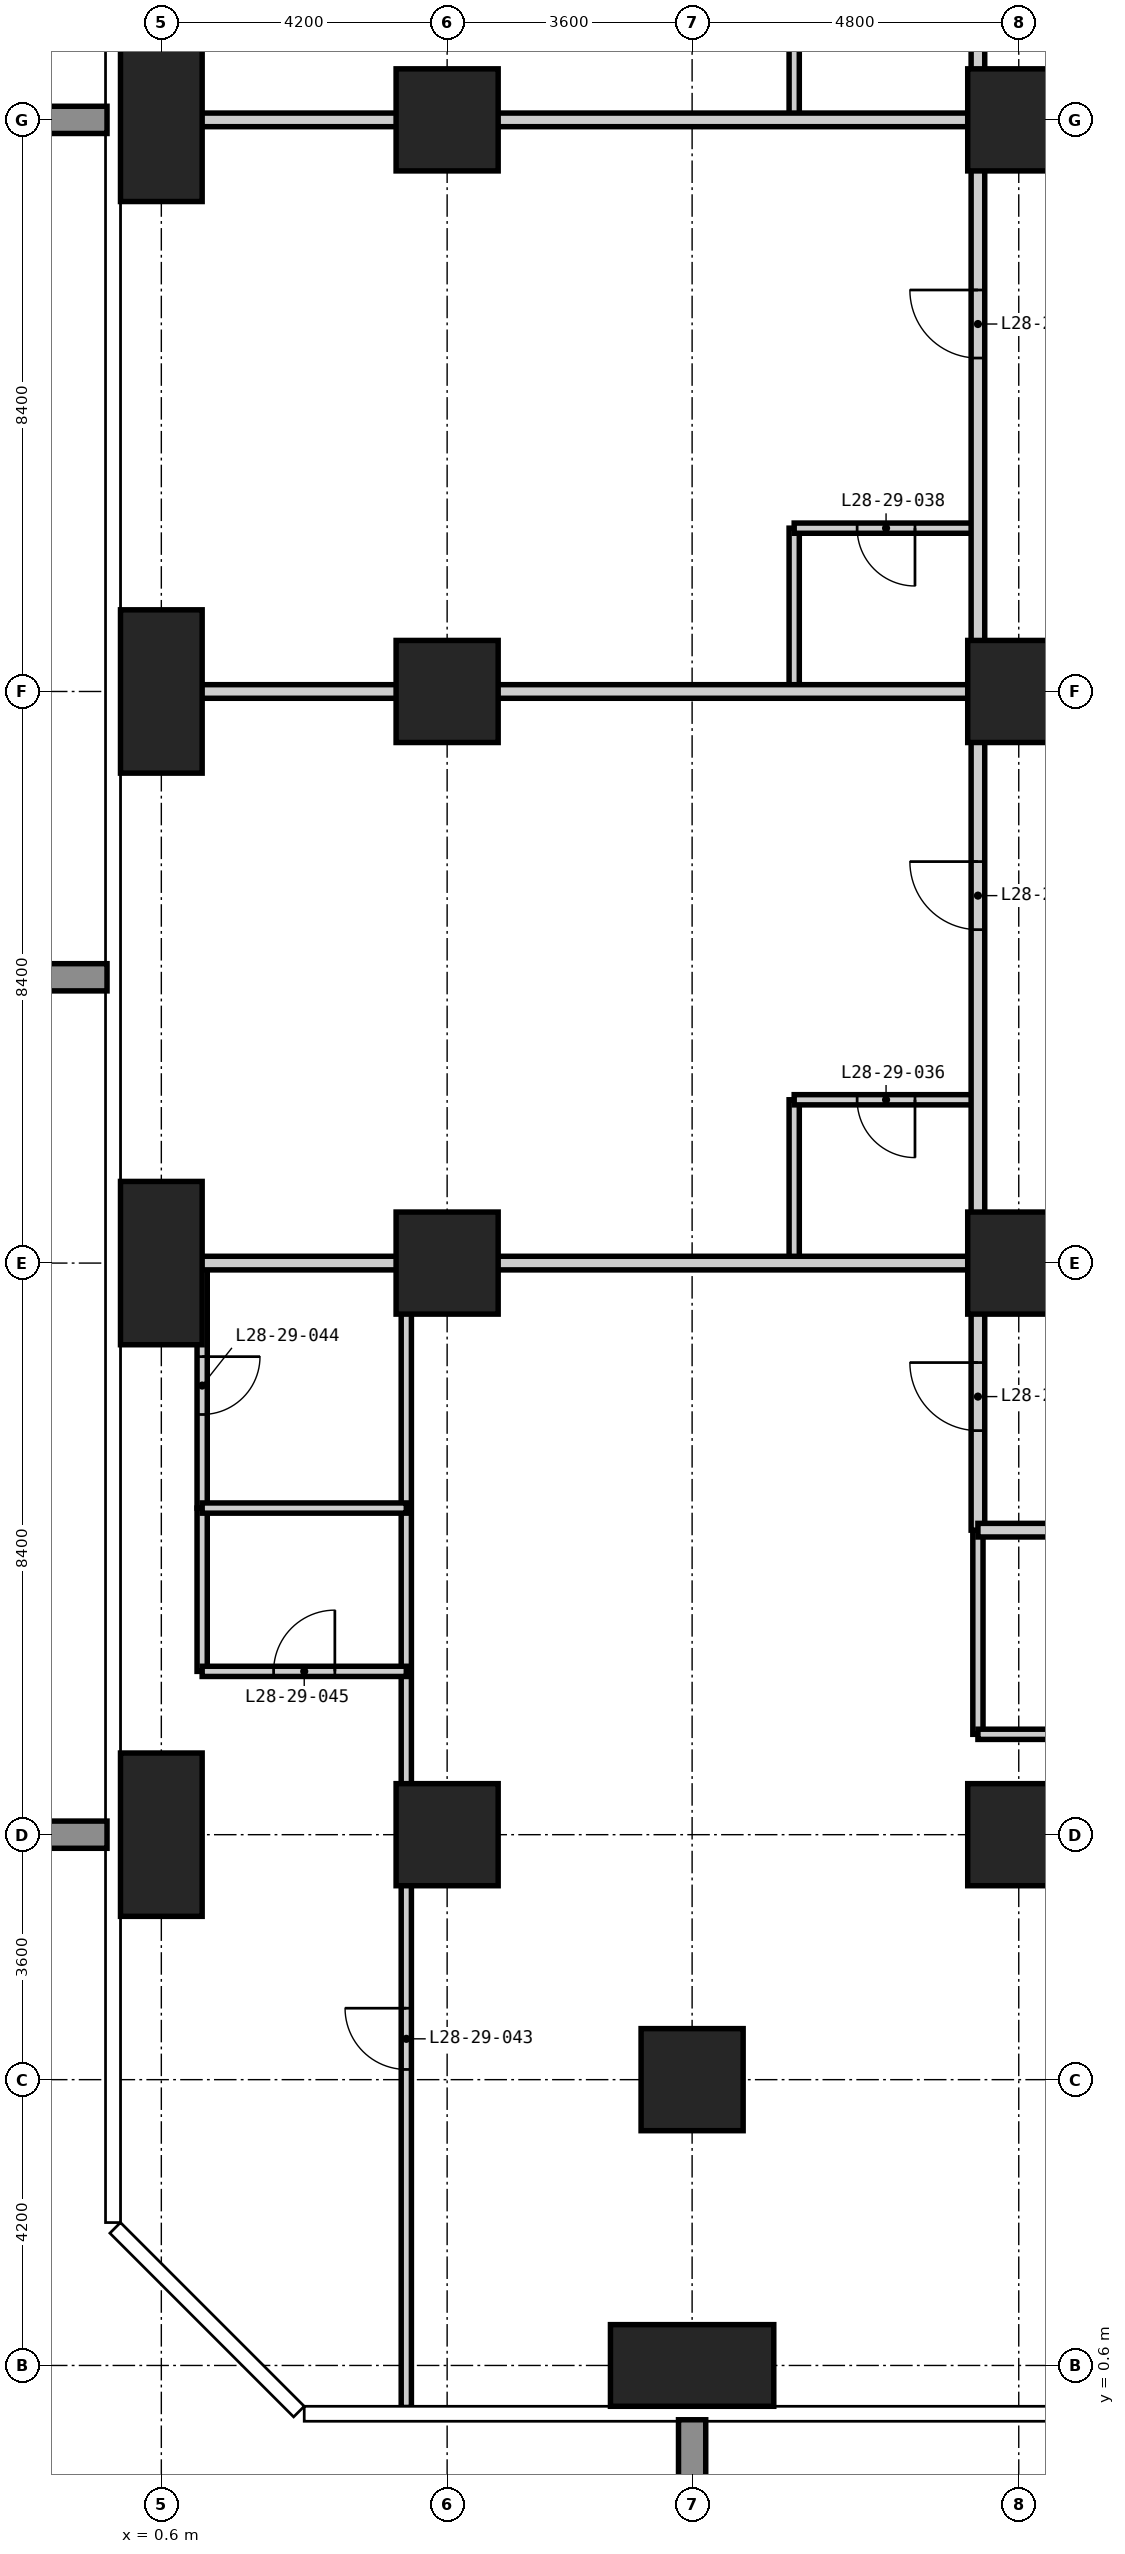
"""IFC4 building model, lengths in metres.
Left out: names, types, materials, properties, quantities, classifications, styles, units other than length and angle.
Written with IfcOpenShell. Run it as: python <this file> out.ifc"""

import sys

from ifc_helpers import new_model, si_unit, direction, frame, frame_2d, origin, origin_2d, place, context, subcontext, project, spatial, rectangle, extrude, element, fill, save


model = new_model("IFC4")
c1 = context("Model", 3, precision=1e-05, world=origin(), true_north=direction((0.0, 1.0)))
c2 = subcontext(c1, "Body", "Model", "MODEL_VIEW")
j1 = project(units=[si_unit("LENGTHUNIT", "METRE"), si_unit("PLANEANGLEUNIT", "RADIAN")], contexts=[c1])
p1 = place(None, origin())
s1 = spatial("IfcSite", under=j1, at=p1, CompositionType="ELEMENT")
p2 = place(p1, origin())
s2 = spatial("IfcBuilding", under=s1, at=p2, CompositionType="ELEMENT")
p3 = place(p2, frame((0.0, 0.0, 111.6)))
s3 = spatial("IfcBuildingStorey", under=s2, at=p3, CompositionType="ELEMENT", Elevation=111.6)
for number, where, z_axis, x_axis in (
    (1, (0.6, 8.4, -0.35), (0.0, 0.0, 1.0), (1.0, 0.0, 0.0)),
    (2, (0.6, 16.8, -0.35), (0.0, 0.0, 1.0), (1.0, 0.0, 0.0)),
    (3, (0.6, 25.2, -0.35), (0.0, 0.0, 1.0), (1.0, 0.0, 0.0)),
    (4, (0.6, 33.6, -0.35), (0.0, 0.0, 1.0), (1.0, 0.0, 0.0)),
):
    element("IfcColumn", number, at=place(p3, frame(where, z_axis=z_axis, x_axis=x_axis)), inside=s3, PredefinedType="COLUMN", context=c2, shape_type="SweptSolid", body=[
        extrude(rectangle(XDim=1.2, YDim=2.4, at=origin_2d()), origin(), (0.0, 0.0, 1.0), 3.6),
    ])
for number, where, z_axis, x_axis in (
    (5, (4.8, 8.4, -0.35), (0.0, 0.0, 1.0), (1.0, 0.0, 0.0)),
    (6, (4.8, 16.8, -0.35), (0.0, 0.0, 1.0), (1.0, 0.0, 0.0)),
    (7, (4.8, 25.2, -0.35), (0.0, 0.0, 1.0), (1.0, 0.0, 0.0)),
    (8, (4.8, 33.6, -0.35), (0.0, 0.0, 1.0), (1.0, 0.0, 0.0)),
):
    element("IfcColumn", number, at=place(p3, frame(where, z_axis=z_axis, x_axis=x_axis)), inside=s3, PredefinedType="COLUMN", context=c2, shape_type="SweptSolid", body=[
        extrude(rectangle(XDim=1.5, YDim=1.5, at=origin_2d()), origin(), (0.0, 0.0, 1.0), 3.6),
    ])
p4 = place(p3, frame((8.4, 0.6, -0.35), z_axis=(0.0, 0.0, 1.0), x_axis=(1.0, 0.0, 0.0)))
e9 = element("IfcColumn", 9, at=p4, inside=s3, PredefinedType="COLUMN", context=c2, shape_type="SweptSolid", body=[
    extrude(rectangle(XDim=2.4, YDim=1.2, at=origin_2d()), origin(), (0.0, 0.0, 1.0), 3.6),
])
for number, where, z_axis, x_axis in (
    (10, (8.4, 4.8, -0.35), (0.0, 0.0, 1.0), (1.0, 0.0, 0.0)),
    (11, (13.2, 8.4, -0.35), (0.0, 0.0, 1.0), (1.0, 0.0, 0.0)),
    (12, (13.2, 16.8, -0.35), (0.0, 0.0, 1.0), (1.0, 0.0, 0.0)),
    (13, (13.2, 25.2, -0.35), (0.0, 0.0, 1.0), (1.0, 0.0, 0.0)),
    (14, (13.2, 33.6, -0.35), (0.0, 0.0, 1.0), (1.0, 0.0, 0.0)),
):
    element("IfcColumn", number, at=place(p3, frame(where, z_axis=z_axis, x_axis=x_axis)), inside=s3, PredefinedType="COLUMN", context=c2, shape_type="SweptSolid", body=[
        extrude(rectangle(XDim=1.5, YDim=1.5, at=origin_2d()), origin(), (0.0, 0.0, 1.0), 3.6),
    ])
p5 = place(p3, frame((1.2, 13.2, 0.0), z_axis=(0.0, 0.0, 1.0), x_axis=(0.0, 1.0, 0.0)))
e15 = element("IfcWall", 15, at=p5, inside=s3, PredefinedType="PARTITIONING", context=c2, shape_type="SweptSolid", body=[
    extrude(rectangle(XDim=3.6, YDim=0.15, at=frame_2d((1.8, 0.0))), origin(), (0.0, 0.0, 1.0), 3.25),
])
p6 = place(p5, frame((1.375, 0.0, 0.0)))
e16 = element("IfcOpeningElement", 16, at=p6, cuts=e15, PredefinedType="OPENING", context=c2, shape_type="SweptSolid", body=[
    extrude(rectangle(XDim=0.85, YDim=2.1, at=frame_2d((0.425, 1.05))), frame((0.0, 0.085, 0.0), z_axis=(0.0, -1.0, 0.0), x_axis=(1.0, 0.0, 0.0)), (0.0, 0.0, 1.0), 0.17),
])
p7 = place(p3, frame((9.9, 16.8, 0.0), z_axis=(0.0, 0.0, 1.0), x_axis=(0.0, 1.0, 0.0)))
e17 = element("IfcWall", 17, at=p7, inside=s3, PredefinedType="PARTITIONING", context=c2, shape_type="SweptSolid", body=[
    extrude(rectangle(XDim=2.4, YDim=0.15, at=frame_2d((1.2, 0.0))), origin(), (0.0, 0.0, 1.0), 3.25),
])
p8 = place(p3, frame((9.9, 25.2, 0.0), z_axis=(0.0, 0.0, 1.0), x_axis=(0.0, 1.0, 0.0)))
e18 = element("IfcWall", 18, at=p8, inside=s3, PredefinedType="PARTITIONING", context=c2, shape_type="SweptSolid", body=[
    extrude(rectangle(XDim=2.4, YDim=0.15, at=frame_2d((1.2, 0.0))), origin(), (0.0, 0.0, 1.0), 3.25),
])
p9 = place(p3, frame((9.9, 33.6, 0.0), z_axis=(0.0, 0.0, 1.0), x_axis=(0.0, 1.0, 0.0)))
e19 = element("IfcWall", 19, at=p9, inside=s3, PredefinedType="PARTITIONING", context=c2, shape_type="SweptSolid", body=[
    extrude(rectangle(XDim=2.4, YDim=0.15, at=frame_2d((1.2, 0.0))), origin(), (0.0, 0.0, 1.0), 3.25),
])
p10 = place(p3, frame((12.6, 9.875, 0.0), z_axis=(0.0, 0.0, 1.0), x_axis=(0.0, 1.0, 0.0)))
e20 = element("IfcWall", 20, at=p10, inside=s3, PredefinedType="PARTITIONING", context=c2, shape_type="SweptSolid", body=[
    extrude(rectangle(XDim=3.0, YDim=0.15, at=frame_2d((1.5, 0.0))), origin(), (0.0, 0.0, 1.0), 3.25),
])
p11 = place(p3, frame((12.6, 9.875, 0.0), z_axis=(0.0, 0.0, 1.0), x_axis=(1.0, 0.0, 0.0)))
e21 = element("IfcWall", 21, at=p11, inside=s3, PredefinedType="PARTITIONING", context=c2, shape_type="SweptSolid", body=[
    extrude(rectangle(XDim=4.2, YDim=0.15, at=frame_2d((2.1, 0.0))), origin(), (0.0, 0.0, 1.0), 3.25),
])
p12 = place(p11, frame((1.675, 0.0, 0.0)))
e22 = element("IfcOpeningElement", 22, at=p12, cuts=e21, PredefinedType="OPENING", context=c2, shape_type="SweptSolid", body=[
    extrude(rectangle(XDim=0.85, YDim=2.1, at=frame_2d((0.425, 1.05))), frame((0.0, 0.085, 0.0), z_axis=(0.0, -1.0, 0.0), x_axis=(1.0, 0.0, 0.0)), (0.0, 0.0, 1.0), 0.17),
])
p13 = place(p3, frame((9.9, 19.2, 0.0), z_axis=(0.0, 0.0, 1.0), x_axis=(1.0, 0.0, 0.0)))
e23 = element("IfcWall", 23, at=p13, inside=s3, PredefinedType="PARTITIONING", context=c2, shape_type="SweptSolid", body=[
    extrude(rectangle(XDim=2.7, YDim=0.15, at=frame_2d((1.35, 0.0))), origin(), (0.0, 0.0, 1.0), 3.25),
])
p14 = place(p13, frame((0.925, 0.0, 0.0)))
e24 = element("IfcOpeningElement", 24, at=p14, cuts=e23, PredefinedType="OPENING", context=c2, shape_type="SweptSolid", body=[
    extrude(rectangle(XDim=0.85, YDim=2.1, at=frame_2d((0.425, 1.05))), frame((0.0, 0.085, 0.0), z_axis=(0.0, -1.0, 0.0), x_axis=(1.0, 0.0, 0.0)), (0.0, 0.0, 1.0), 0.17),
])
p15 = place(p3, frame((9.9, 27.6, 0.0), z_axis=(0.0, 0.0, 1.0), x_axis=(1.0, 0.0, 0.0)))
e25 = element("IfcWall", 25, at=p15, inside=s3, PredefinedType="PARTITIONING", context=c2, shape_type="SweptSolid", body=[
    extrude(rectangle(XDim=2.7, YDim=0.15, at=frame_2d((1.35, 0.0))), origin(), (0.0, 0.0, 1.0), 3.25),
])
p16 = place(p15, frame((0.925, 0.0, 0.0)))
e26 = element("IfcOpeningElement", 26, at=p16, cuts=e25, PredefinedType="OPENING", context=c2, shape_type="SweptSolid", body=[
    extrude(rectangle(XDim=0.85, YDim=2.1, at=frame_2d((0.425, 1.05))), frame((0.0, 0.085, 0.0), z_axis=(0.0, -1.0, 0.0), x_axis=(1.0, 0.0, 0.0)), (0.0, 0.0, 1.0), 0.17),
])
p17 = place(p3, frame((12.6, 12.875, 0.0), z_axis=(0.0, 0.0, 1.0), x_axis=(0.0, 1.0, 0.0)))
e27 = element("IfcWall", 27, at=p17, inside=s3, PredefinedType="PARTITIONING", context=c2, shape_type="SweptSolid", body=[
    extrude(rectangle(XDim=31.85, YDim=0.2, at=frame_2d((15.925, 0.0))), origin(), (0.0, 0.0, 1.0), 3.25),
])
p18 = place(p17, frame((8.825, 0.0, 0.0)))
e28 = element("IfcOpeningElement", 28, at=p18, cuts=e27, PredefinedType="OPENING", context=c2, shape_type="SweptSolid", body=[
    extrude(rectangle(XDim=1.0, YDim=2.2, at=frame_2d((0.5, 1.1))), frame((0.0, 0.11, 0.0), z_axis=(0.0, -1.0, 0.0), x_axis=(1.0, 0.0, 0.0)), (0.0, 0.0, 1.0), 0.22),
])
p19 = place(p17, frame((17.225, 0.0, 0.0)))
e29 = element("IfcOpeningElement", 29, at=p19, cuts=e27, PredefinedType="OPENING", context=c2, shape_type="SweptSolid", body=[
    extrude(rectangle(XDim=1.0, YDim=2.2, at=frame_2d((0.5, 1.1))), frame((0.0, 0.11, 0.0), z_axis=(0.0, -1.0, 0.0), x_axis=(1.0, 0.0, 0.0)), (0.0, 0.0, 1.0), 0.22),
])
p20 = place(p17, frame((25.625, 0.0, 0.0)))
e30 = element("IfcOpeningElement", 30, at=p20, cuts=e27, PredefinedType="OPENING", context=c2, shape_type="SweptSolid", body=[
    extrude(rectangle(XDim=1.0, YDim=2.2, at=frame_2d((0.5, 1.1))), frame((0.0, 0.11, 0.0), z_axis=(0.0, -1.0, 0.0), x_axis=(1.0, 0.0, 0.0)), (0.0, 0.0, 1.0), 0.22),
])
p21 = place(p17, frame((1.463, 0.0, 0.0)))
e31 = element("IfcOpeningElement", 31, at=p21, cuts=e27, PredefinedType="OPENING", context=c2, shape_type="SweptSolid", body=[
    extrude(rectangle(XDim=1.0, YDim=2.2, at=frame_2d((0.5, 1.1))), frame((0.0, 0.11, 0.0), z_axis=(0.0, -1.0, 0.0), x_axis=(1.0, 0.0, 0.0)), (0.0, 0.0, 1.0), 0.22),
])
p22 = place(p17, frame((29.987, 0.0, 0.0)))
e32 = element("IfcOpeningElement", 32, at=p22, cuts=e27, PredefinedType="OPENING", context=c2, shape_type="SweptSolid", body=[
    extrude(rectangle(XDim=1.0, YDim=2.2, at=frame_2d((0.5, 1.1))), frame((0.0, 0.11, 0.0), z_axis=(0.0, -1.0, 0.0), x_axis=(1.0, 0.0, 0.0)), (0.0, 0.0, 1.0), 0.22),
])
p23 = place(p3, frame((45.325, 12.875, 0.0), z_axis=(0.0, 0.0, 1.0), x_axis=(-1.0, 0.0, 0.0)))
e33 = element("IfcWall", 33, at=p23, inside=s3, PredefinedType="PARTITIONING", context=c2, shape_type="SweptSolid", body=[
    extrude(rectangle(XDim=32.725, YDim=0.2, at=frame_2d((16.362, 0.0))), origin(), (0.0, 0.0, 1.0), 3.25),
])
p24 = place(p23, frame((22.625, 0.0, 0.0)))
e34 = element("IfcOpeningElement", 34, at=p24, cuts=e33, PredefinedType="OPENING", context=c2, shape_type="SweptSolid", body=[
    extrude(rectangle(XDim=1.0, YDim=2.2, at=frame_2d((0.5, 1.1))), frame((0.0, 0.11, 0.0), z_axis=(0.0, -1.0, 0.0), x_axis=(1.0, 0.0, 0.0)), (0.0, 0.0, 1.0), 0.22),
])
p25 = place(p23, frame((14.225, 0.0, 0.0)))
e35 = element("IfcOpeningElement", 35, at=p25, cuts=e33, PredefinedType="OPENING", context=c2, shape_type="SweptSolid", body=[
    extrude(rectangle(XDim=1.0, YDim=2.2, at=frame_2d((0.5, 1.1))), frame((0.0, 0.11, 0.0), z_axis=(0.0, -1.0, 0.0), x_axis=(1.0, 0.0, 0.0)), (0.0, 0.0, 1.0), 0.22),
])
p26 = place(p23, frame((5.825, 0.0, 0.0)))
e36 = element("IfcOpeningElement", 36, at=p26, cuts=e33, PredefinedType="OPENING", context=c2, shape_type="SweptSolid", body=[
    extrude(rectangle(XDim=1.0, YDim=2.2, at=frame_2d((0.5, 1.1))), frame((0.0, 0.11, 0.0), z_axis=(0.0, -1.0, 0.0), x_axis=(1.0, 0.0, 0.0)), (0.0, 0.0, 1.0), 0.22),
])
for number, where, z_axis, x_axis in (
    (37, (-0.018, 16.8, 0.0), (0.0, 0.0, 1.0), (1.0, 0.0, 0.0)),
    (38, (-0.018, 25.2, 0.0), (0.0, 0.0, 1.0), (1.0, 0.0, 0.0)),
    (39, (-0.018, 33.6, 0.0), (0.0, 0.0, 1.0), (1.0, 0.0, 0.0)),
):
    element("IfcWall", number, at=place(p3, frame(where, z_axis=z_axis, x_axis=x_axis)), inside=s3, PredefinedType="PARTITIONING", context=c2, shape_type="SweptSolid", body=[
        extrude(rectangle(XDim=12.618, YDim=0.2, at=frame_2d((6.309, 0.0))), origin(), (0.0, 0.0, 1.0), 3.25),
    ])
p27 = place(p3, frame((1.2, 10.8, 0.0), z_axis=(0.0, 0.0, 1.0), x_axis=(0.0, 1.0, 0.0)))
e40 = element("IfcWall", 40, at=p27, inside=s3, PredefinedType="PARTITIONING", context=c2, shape_type="SweptSolid", body=[
    extrude(rectangle(XDim=2.4, YDim=0.15, at=frame_2d((1.2, 0.0))), origin(), (0.0, 0.0, 1.0), 3.25),
])
p28 = place(p3, frame((4.2, -0.018, 0.0), z_axis=(0.0, 0.0, 1.0), x_axis=(0.0, 1.0, 0.0)))
e41 = element("IfcWall", 41, at=p28, inside=s3, PredefinedType="PARTITIONING", context=c2, shape_type="SweptSolid", body=[
    extrude(rectangle(XDim=16.818, YDim=0.15, at=frame_2d((8.409, 0.0))), origin(), (0.0, 0.0, 1.0), 3.25),
])
p29 = place(p28, frame((4.968, 0.0, 0.0)))
e42 = element("IfcOpeningElement", 42, at=p29, cuts=e41, PredefinedType="OPENING", context=c2, shape_type="SweptSolid", body=[
    extrude(rectangle(XDim=0.9, YDim=2.1, at=frame_2d((0.45, 1.05))), frame((0.0, 0.085, 0.0), z_axis=(0.0, -1.0, 0.0), x_axis=(1.0, 0.0, 0.0)), (0.0, 0.0, 1.0), 0.17),
])
p30 = place(p3, frame((1.2, 10.8, 0.0), z_axis=(0.0, 0.0, 1.0), x_axis=(1.0, 0.0, 0.0)))
e43 = element("IfcWall", 43, at=p30, inside=s3, PredefinedType="PARTITIONING", context=c2, shape_type="SweptSolid", body=[
    extrude(rectangle(XDim=3.0, YDim=0.15, at=frame_2d((1.5, 0.0))), origin(), (0.0, 0.0, 1.0), 3.25),
])
p31 = place(p30, frame((1.05, 0.0, 0.0)))
e44 = element("IfcOpeningElement", 44, at=p31, cuts=e43, PredefinedType="OPENING", context=c2, shape_type="SweptSolid", body=[
    extrude(rectangle(XDim=0.9, YDim=2.1, at=frame_2d((0.45, 1.05))), frame((0.0, 0.085, 0.0), z_axis=(0.0, -1.0, 0.0), x_axis=(1.0, 0.0, 0.0)), (0.0, 0.0, 1.0), 0.17),
])
p32 = place(p3, frame((1.2, 13.2, 0.0), z_axis=(0.0, 0.0, 1.0), x_axis=(1.0, 0.0, 0.0)))
e45 = element("IfcWall", 45, at=p32, inside=s3, PredefinedType="PARTITIONING", context=c2, shape_type="SweptSolid", body=[
    extrude(rectangle(XDim=3.0, YDim=0.15, at=frame_2d((1.5, 0.0))), origin(), (0.0, 0.0, 1.0), 3.25),
])
p33 = place(p18, origin())
e46 = element("IfcDoor", 46, at=p33, inside=s3, OperationType="SINGLE_SWING_RIGHT", PredefinedType="DOOR", context=c2, shape_type="SweptSolid", body=[
    extrude(rectangle(XDim=1.0, YDim=2.2, at=frame_2d((0.5, 1.1))), frame((0.0, 0.025, 0.0), z_axis=(0.0, -1.0, 0.0), x_axis=(1.0, 0.0, 0.0)), (0.0, 0.0, 1.0), 0.05),
])
fill(e28, e46)
p34 = place(p14, frame((0.85, 0.0, 0.0), z_axis=(0.0, 0.0, 1.0), x_axis=(-1.0, 0.0, 0.0)))
e47 = element("IfcDoor", 47, at=p34, inside=s3, OperationType="SINGLE_SWING_LEFT", PredefinedType="DOOR", context=c2, shape_type="SweptSolid", body=[
    extrude(rectangle(XDim=0.85, YDim=2.1, at=frame_2d((0.425, 1.05))), frame((0.0, 0.025, 0.0), z_axis=(0.0, -1.0, 0.0), x_axis=(1.0, 0.0, 0.0)), (0.0, 0.0, 1.0), 0.05),
])
fill(e24, e47)
p35 = place(p19, origin())
e48 = element("IfcDoor", 48, at=p35, inside=s3, OperationType="SINGLE_SWING_RIGHT", PredefinedType="DOOR", context=c2, shape_type="SweptSolid", body=[
    extrude(rectangle(XDim=1.0, YDim=2.2, at=frame_2d((0.5, 1.1))), frame((0.0, 0.025, 0.0), z_axis=(0.0, -1.0, 0.0), x_axis=(1.0, 0.0, 0.0)), (0.0, 0.0, 1.0), 0.05),
])
fill(e29, e48)
p36 = place(p16, frame((0.85, 0.0, 0.0), z_axis=(0.0, 0.0, 1.0), x_axis=(-1.0, 0.0, 0.0)))
e49 = element("IfcDoor", 49, at=p36, inside=s3, OperationType="SINGLE_SWING_LEFT", PredefinedType="DOOR", context=c2, shape_type="SweptSolid", body=[
    extrude(rectangle(XDim=0.85, YDim=2.1, at=frame_2d((0.425, 1.05))), frame((0.0, 0.025, 0.0), z_axis=(0.0, -1.0, 0.0), x_axis=(1.0, 0.0, 0.0)), (0.0, 0.0, 1.0), 0.05),
])
fill(e26, e49)
p37 = place(p21, origin())
e50 = element("IfcDoor", 50, at=p37, inside=s3, OperationType="SINGLE_SWING_RIGHT", PredefinedType="DOOR", context=c2, shape_type="SweptSolid", body=[
    extrude(rectangle(XDim=1.0, YDim=2.2, at=frame_2d((0.5, 1.1))), frame((0.0, 0.025, 0.0), z_axis=(0.0, -1.0, 0.0), x_axis=(1.0, 0.0, 0.0)), (0.0, 0.0, 1.0), 0.05),
])
fill(e31, e50)
p38 = place(p29, origin())
e51 = element("IfcDoor", 51, at=p38, inside=s3, OperationType="SINGLE_SWING_RIGHT", PredefinedType="DOOR", context=c2, shape_type="SweptSolid", body=[
    extrude(rectangle(XDim=0.9, YDim=2.1, at=frame_2d((0.45, 1.05))), frame((0.0, 0.025, 0.0), z_axis=(0.0, -1.0, 0.0), x_axis=(1.0, 0.0, 0.0)), (0.0, 0.0, 1.0), 0.05),
])
fill(e42, e51)
p39 = place(p6, frame((0.85, 0.0, 0.0), z_axis=(0.0, 0.0, 1.0), x_axis=(-1.0, 0.0, 0.0)))
e52 = element("IfcDoor", 52, at=p39, inside=s3, OperationType="SINGLE_SWING_LEFT", PredefinedType="DOOR", context=c2, shape_type="SweptSolid", body=[
    extrude(rectangle(XDim=0.85, YDim=2.1, at=frame_2d((0.425, 1.05))), frame((0.0, 0.025, 0.0), z_axis=(0.0, -1.0, 0.0), x_axis=(1.0, 0.0, 0.0)), (0.0, 0.0, 1.0), 0.05),
])
fill(e16, e52)
p40 = place(p31, origin())
e53 = element("IfcDoor", 53, at=p40, inside=s3, OperationType="SINGLE_SWING_RIGHT", PredefinedType="DOOR", context=c2, shape_type="SweptSolid", body=[
    extrude(rectangle(XDim=0.9, YDim=2.1, at=frame_2d((0.45, 1.05))), frame((0.0, 0.025, 0.0), z_axis=(0.0, -1.0, 0.0), x_axis=(1.0, 0.0, 0.0)), (0.0, 0.0, 1.0), 0.05),
])
fill(e44, e53)
save(model, sys.argv[1])
